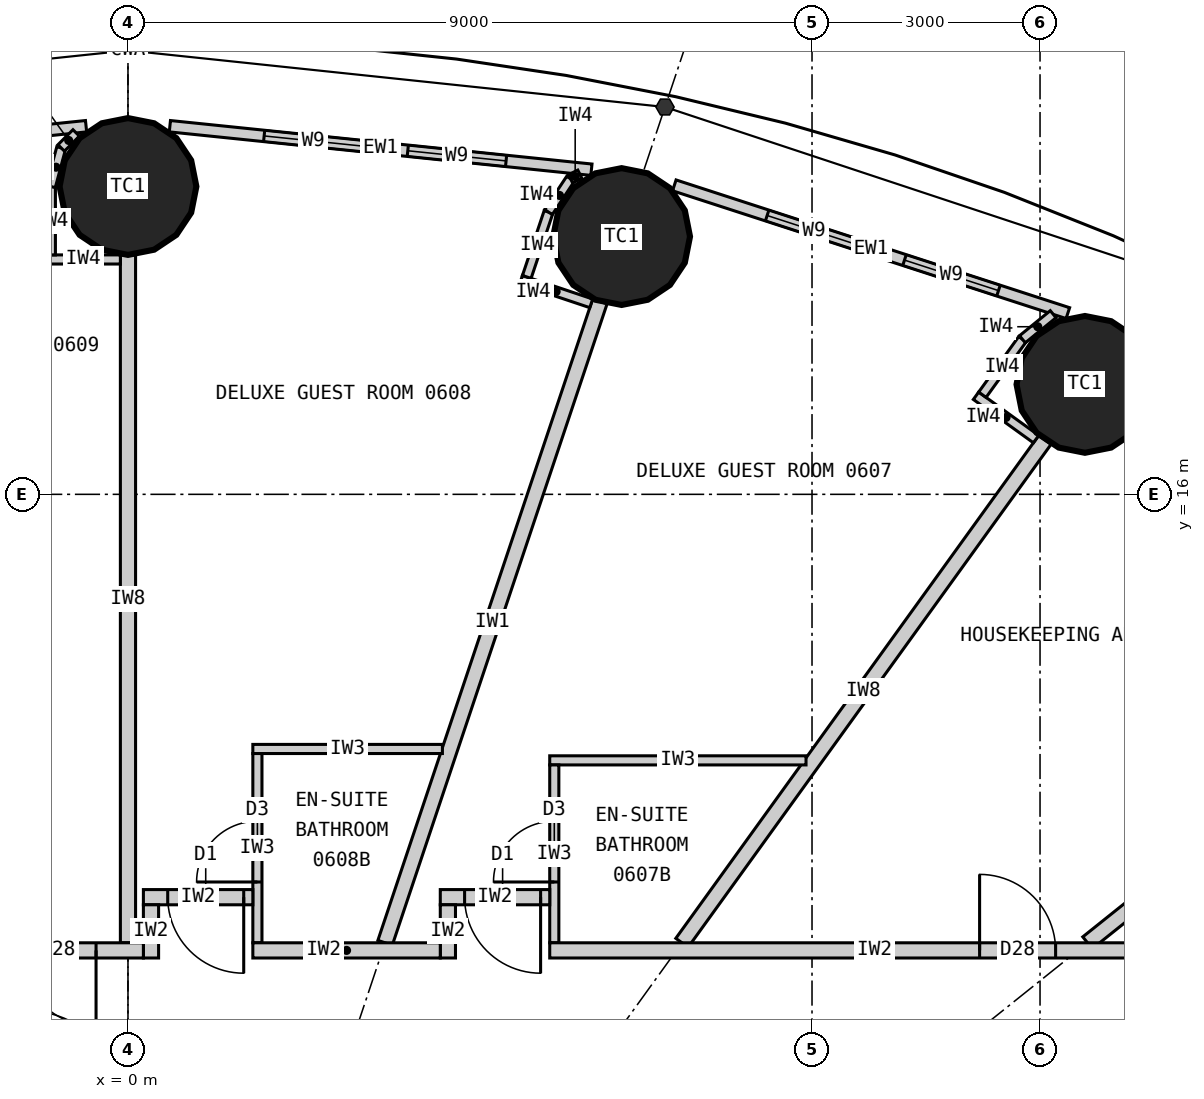
"""IFC4 building model, lengths in metres.
Left out: names, types, materials, properties, quantities, classifications, styles, units other than length and angle.
Written with IfcOpenShell. Run it as: python <this file> out.ifc"""

import sys

from ifc_helpers import new_model, si_unit, direction, frame, frame_2d, origin, origin_2d, place, context, subcontext, project, spatial, rectangle, circle, extrude, element, fill, save


model = new_model("IFC4")
c1 = context("Model", 3, precision=1e-05, world=origin(), true_north=direction((0.0, 1.0)))
c2 = subcontext(c1, "Body", "Model", "MODEL_VIEW")
j1 = project(units=[si_unit("LENGTHUNIT", "METRE"), si_unit("PLANEANGLEUNIT", "RADIAN")], contexts=[c1])
p1 = place(None, origin())
s1 = spatial("IfcSite", under=j1, at=p1, CompositionType="ELEMENT")
p2 = place(p1, origin())
s2 = spatial("IfcBuilding", under=s1, at=p2, CompositionType="ELEMENT")
p3 = place(p2, frame((0.0, 0.0, 32.7)))
s3 = spatial("IfcBuildingStorey", under=s2, at=p3, CompositionType="ELEMENT", Elevation=32.7)
for number, where, z_axis, x_axis in (
    (1, (12.591, 17.447, 0.0), (0.0, 0.0, 1.0), (1.0, 0.0, 0.0)),
    (2, (6.495, 19.391, 0.0), (0.0, 0.0, 1.0), (1.0, 0.0, 0.0)),
    (3, (0.0, 20.05, 0.0), (0.0, 0.0, 1.0), (1.0, 0.0, 0.0)),
):
    element("IfcColumn", number, at=place(p3, frame(where, z_axis=z_axis, x_axis=x_axis)), inside=s3, PredefinedType="COLUMN", context=c2, shape_type="SweptSolid", body=[
        extrude(circle(Radius=0.9, at=origin_2d()), origin(), (0.0, 0.0, 1.0), 3.3),
    ])
p4 = place(p3, frame((12.366, 18.384, 0.0), z_axis=(0.0, 0.0, 1.0), x_axis=(-0.951138486029, 0.308764603532, 0.0)))
e4 = element("IfcWall", 4, at=p4, inside=s3, PredefinedType="ELEMENTEDWALL", context=c2, shape_type="SweptSolid", body=[
    extrude(rectangle(XDim=5.444, YDim=0.15, at=frame_2d((2.722, 0.0))), origin(), (0.0, 0.0, 1.0), 3.12),
])
p5 = place(p4, frame((0.96, 0.0, 0.9)))
e5 = element("IfcOpeningElement", 5, at=p5, cuts=e4, PredefinedType="OPENING", context=c2, shape_type="SweptSolid", body=[
    extrude(rectangle(XDim=1.3, YDim=1.9, at=frame_2d((0.65, 0.95))), frame((0.0, 0.085, 0.0), z_axis=(0.0, -1.0, 0.0), x_axis=(1.0, 0.0, 0.0)), (0.0, 0.0, 1.0), 0.17),
])
p6 = place(p4, frame((2.86, 0.0, 0.9)))
e6 = element("IfcOpeningElement", 6, at=p6, cuts=e4, PredefinedType="OPENING", context=c2, shape_type="SweptSolid", body=[
    extrude(rectangle(XDim=1.3, YDim=1.9, at=frame_2d((0.65, 0.95))), frame((0.0, 0.085, 0.0), z_axis=(0.0, -1.0, 0.0), x_axis=(1.0, 0.0, 0.0)), (0.0, 0.0, 1.0), 0.17),
])
p7 = place(p3, frame((6.098, 20.271, 0.0), z_axis=(0.0, 0.0, 1.0), x_axis=(-0.994723735084, 0.102589915983, 0.0)))
e7 = element("IfcWall", 7, at=p7, inside=s3, PredefinedType="ELEMENTEDWALL", context=c2, shape_type="SweptSolid", body=[
    extrude(rectangle(XDim=5.576, YDim=0.15, at=frame_2d((2.788, 0.0))), origin(), (0.0, 0.0, 1.0), 3.12),
])
p8 = place(p7, frame((1.129, 0.0, 0.9)))
e8 = element("IfcOpeningElement", 8, at=p8, cuts=e7, PredefinedType="OPENING", context=c2, shape_type="SweptSolid", body=[
    extrude(rectangle(XDim=1.3, YDim=1.9, at=frame_2d((0.65, 0.95))), frame((0.0, 0.085, 0.0), z_axis=(0.0, -1.0, 0.0), x_axis=(1.0, 0.0, 0.0)), (0.0, 0.0, 1.0), 0.17),
])
p9 = place(p7, frame((3.029, 0.0, 0.9)))
e9 = element("IfcOpeningElement", 9, at=p9, cuts=e7, PredefinedType="OPENING", context=c2, shape_type="SweptSolid", body=[
    extrude(rectangle(XDim=1.3, YDim=1.9, at=frame_2d((0.65, 0.95))), frame((0.0, 0.085, 0.0), z_axis=(0.0, -1.0, 0.0), x_axis=(1.0, 0.0, 0.0)), (0.0, 0.0, 1.0), 0.17),
])
p10 = place(p3, frame((-0.551, 20.843, 0.0), z_axis=(0.0, 0.0, 1.0), x_axis=(-0.994723735084, -0.102589915983, 0.0)))
e10 = element("IfcWall", 10, at=p10, inside=s3, PredefinedType="ELEMENTEDWALL", context=c2, shape_type="SweptSolid", body=[
    extrude(rectangle(XDim=5.576, YDim=0.15, at=frame_2d((2.788, 0.0))), origin(), (0.0, 0.0, 1.0), 3.12),
])
p11 = place(p10, frame((1.247, 0.0, 0.9)))
e11 = element("IfcOpeningElement", 11, at=p11, cuts=e10, PredefinedType="OPENING", context=c2, shape_type="SweptSolid", body=[
    extrude(rectangle(XDim=1.3, YDim=1.9, at=frame_2d((0.65, 0.95))), frame((0.0, 0.085, 0.0), z_axis=(0.0, -1.0, 0.0), x_axis=(1.0, 0.0, 0.0)), (0.0, 0.0, 1.0), 0.17),
])
p12 = place(p10, frame((3.147, 0.0, 0.9)))
e12 = element("IfcOpeningElement", 12, at=p12, cuts=e10, PredefinedType="OPENING", context=c2, shape_type="SweptSolid", body=[
    extrude(rectangle(XDim=1.3, YDim=1.9, at=frame_2d((0.65, 0.95))), frame((0.0, 0.085, 0.0), z_axis=(0.0, -1.0, 0.0), x_axis=(1.0, 0.0, 0.0)), (0.0, 0.0, 1.0), 0.17),
])
p13 = place(p3, frame((12.625, 10.1, 0.0), z_axis=(0.0, 0.0, 1.0), x_axis=(0.780872884676, 0.624689953479, 0.0)))
e13 = element("IfcWall", 13, at=p13, inside=s3, PredefinedType="PARTITIONING", context=c2, shape_type="SweptSolid", body=[
    extrude(rectangle(XDim=5.845, YDim=0.2, at=frame_2d((2.922, 0.0))), origin(), (0.0, 0.0, 1.0), 2.32),
])
p14 = place(p3, frame((7.289, 10.1, 0.0), z_axis=(0.0, 0.0, 1.0), x_axis=(0.585216319319, 0.810877216108, 0.0)))
e14 = element("IfcWall", 14, at=p14, inside=s3, PredefinedType="PARTITIONING", context=c2, shape_type="SweptSolid", body=[
    extrude(rectangle(XDim=8.16, YDim=0.2, at=frame_2d((4.08, 0.0))), origin(), (0.0, 0.0, 1.0), 2.32),
])
p15 = place(p3, frame((3.383, 10.1, 0.0), z_axis=(0.0, 0.0, 1.0), x_axis=(0.317593727596, 0.948226884344, 0.0)))
e15 = element("IfcWall", 15, at=p15, inside=s3, PredefinedType="PARTITIONING", context=c2, shape_type="SweptSolid", body=[
    extrude(rectangle(XDim=8.899, YDim=0.2, at=frame_2d((4.449, 0.0))), origin(), (0.0, 0.0, 1.0), 2.32),
])
p16 = place(p3, frame((0.0, 10.1, 0.0), z_axis=(0.0, 0.0, 1.0), x_axis=(0.0, 1.0, 0.0)))
e16 = element("IfcWall", 16, at=p16, inside=s3, PredefinedType="PARTITIONING", context=c2, shape_type="SweptSolid", body=[
    extrude(rectangle(XDim=9.05, YDim=0.2, at=frame_2d((4.525, 0.0))), origin(), (0.0, 0.0, 1.0), 2.32),
])
p17 = place(p3, frame((8.921, 12.5, 0.0), z_axis=(0.0, 0.0, 1.0), x_axis=(-1.0, 0.0, 0.0)))
e17 = element("IfcWall", 17, at=p17, inside=s3, PredefinedType="PARTITIONING", context=c2, shape_type="SweptSolid", body=[
    extrude(rectangle(XDim=3.372, YDim=0.12, at=frame_2d((1.686, 0.0))), origin(), (0.0, 0.0, 1.0), 3.12),
])
p18 = place(p3, frame((5.609, 10.1, 0.0), z_axis=(0.0, 0.0, 1.0), x_axis=(0.0, 1.0, 0.0)))
e18 = element("IfcWall", 18, at=p18, inside=s3, PredefinedType="PARTITIONING", context=c2, shape_type="SweptSolid", body=[
    extrude(rectangle(XDim=2.34, YDim=0.12, at=frame_2d((1.17, 0.0))), origin(), (0.0, 0.0, 1.0), 3.12),
])
p19 = place(p18, frame((0.8, 0.0, 0.0)))
e19 = element("IfcOpeningElement", 19, at=p19, cuts=e18, PredefinedType="OPENING", context=c2, shape_type="SweptSolid", body=[
    extrude(rectangle(XDim=0.8, YDim=2.1, at=frame_2d((0.4, 1.05))), frame((0.0, 0.07, 0.0), z_axis=(0.0, -1.0, 0.0), x_axis=(1.0, 0.0, 0.0)), (0.0, 0.0, 1.0), 0.14),
])
p20 = place(p3, frame((4.137, 12.65, 0.0), z_axis=(0.0, 0.0, 1.0), x_axis=(-1.0, 0.0, 0.0)))
e20 = element("IfcWall", 20, at=p20, inside=s3, PredefinedType="PARTITIONING", context=c2, shape_type="SweptSolid", body=[
    extrude(rectangle(XDim=2.494, YDim=0.12, at=frame_2d((1.247, 0.0))), origin(), (0.0, 0.0, 1.0), 3.12),
])
p21 = place(p3, frame((1.703, 10.1, 0.0), z_axis=(0.0, 0.0, 1.0), x_axis=(0.0, 1.0, 0.0)))
e21 = element("IfcWall", 21, at=p21, inside=s3, PredefinedType="PARTITIONING", context=c2, shape_type="SweptSolid", body=[
    extrude(rectangle(XDim=2.49, YDim=0.12, at=frame_2d((1.245, 0.0))), origin(), (0.0, 0.0, 1.0), 3.12),
])
p22 = place(p21, frame((0.8, 0.0, 0.0)))
e22 = element("IfcOpeningElement", 22, at=p22, cuts=e21, PredefinedType="OPENING", context=c2, shape_type="SweptSolid", body=[
    extrude(rectangle(XDim=0.8, YDim=2.1, at=frame_2d((0.4, 1.05))), frame((0.0, 0.07, 0.0), z_axis=(0.0, -1.0, 0.0), x_axis=(1.0, 0.0, 0.0)), (0.0, 0.0, 1.0), 0.14),
])
p23 = place(p3, frame((4.109, 10.7, 0.0), z_axis=(0.0, 0.0, 1.0), x_axis=(1.0, 0.0, 0.0)))
e23 = element("IfcWall", 23, at=p23, inside=s3, PredefinedType="PARTITIONING", context=c2, shape_type="SweptSolid", body=[
    extrude(rectangle(XDim=1.44, YDim=0.2, at=frame_2d((0.72, 0.0))), origin(), (0.0, 0.0, 1.0), 3.12),
])
p24 = place(p23, frame((0.32, 0.0, 0.0)))
e24 = element("IfcOpeningElement", 24, at=p24, cuts=e23, PredefinedType="OPENING", context=c2, shape_type="SweptSolid", body=[
    extrude(rectangle(XDim=1.0, YDim=2.2, at=frame_2d((0.5, 1.1))), frame((0.0, 0.11, 0.0), z_axis=(0.0, -1.0, 0.0), x_axis=(1.0, 0.0, 0.0)), (0.0, 0.0, 1.0), 0.22),
])
p25 = place(p3, frame((4.209, 9.9, 0.0), z_axis=(0.0, 0.0, 1.0), x_axis=(0.0, 1.0, 0.0)))
e25 = element("IfcWall", 25, at=p25, inside=s3, PredefinedType="PARTITIONING", context=c2, shape_type="SweptSolid", body=[
    extrude(rectangle(XDim=0.7, YDim=0.2, at=frame_2d((0.35, 0.0))), origin(), (0.0, 0.0, 1.0), 3.12),
])
p26 = place(p3, frame((0.203, 10.7, 0.0), z_axis=(0.0, 0.0, 1.0), x_axis=(1.0, 0.0, 0.0)))
e26 = element("IfcWall", 26, at=p26, inside=s3, PredefinedType="PARTITIONING", context=c2, shape_type="SweptSolid", body=[
    extrude(rectangle(XDim=1.44, YDim=0.2, at=frame_2d((0.72, 0.0))), origin(), (0.0, 0.0, 1.0), 3.12),
])
p27 = place(p26, frame((0.32, 0.0, 0.0)))
e27 = element("IfcOpeningElement", 27, at=p27, cuts=e26, PredefinedType="OPENING", context=c2, shape_type="SweptSolid", body=[
    extrude(rectangle(XDim=1.0, YDim=2.2, at=frame_2d((0.5, 1.1))), frame((0.0, 0.11, 0.0), z_axis=(0.0, -1.0, 0.0), x_axis=(1.0, 0.0, 0.0)), (0.0, 0.0, 1.0), 0.22),
])
p28 = place(p3, frame((0.303, 9.9, 0.0), z_axis=(0.0, 0.0, 1.0), x_axis=(0.0, 1.0, 0.0)))
e28 = element("IfcWall", 28, at=p28, inside=s3, PredefinedType="PARTITIONING", context=c2, shape_type="SweptSolid", body=[
    extrude(rectangle(XDim=0.7, YDim=0.2, at=frame_2d((0.35, 0.0))), origin(), (0.0, 0.0, 1.0), 3.12),
])
p29 = place(p3, frame((-4.109, 10.0, 0.0), z_axis=(0.0, 0.0, 1.0), x_axis=(1.0, 0.0, 0.0)))
e29 = element("IfcWall", 29, at=p29, inside=s3, PredefinedType="PARTITIONING", context=c2, shape_type="SweptSolid", body=[
    extrude(rectangle(XDim=4.312, YDim=0.2, at=frame_2d((2.156, 0.0))), origin(), (0.0, 0.0, 1.0), 3.12),
])
p30 = place(p29, frame((2.689, 0.0, 0.0)))
e30 = element("IfcOpeningElement", 30, at=p30, cuts=e29, PredefinedType="OPENING", context=c2, shape_type="SweptSolid", body=[
    extrude(rectangle(XDim=1.0, YDim=2.2, at=frame_2d((0.5, 1.1))), frame((0.0, 0.11, 0.0), z_axis=(0.0, -1.0, 0.0), x_axis=(1.0, 0.0, 0.0)), (0.0, 0.0, 1.0), 0.22),
])
p31 = place(p3, frame((1.643, 10.0, 0.0), z_axis=(0.0, 0.0, 1.0), x_axis=(1.0, 0.0, 0.0)))
e31 = element("IfcWall", 31, at=p31, inside=s3, PredefinedType="PARTITIONING", context=c2, shape_type="SweptSolid", body=[
    extrude(rectangle(XDim=2.466, YDim=0.2, at=frame_2d((1.233, 0.0))), origin(), (0.0, 0.0, 1.0), 3.12),
])
p32 = place(p3, frame((5.549, 10.0, 0.0), z_axis=(0.0, 0.0, 1.0), x_axis=(1.0, 0.0, 0.0)))
e32 = element("IfcWall", 32, at=p32, inside=s3, PredefinedType="PARTITIONING", context=c2, shape_type="SweptSolid", body=[
    extrude(rectangle(XDim=8.551, YDim=0.2, at=frame_2d((4.275, 0.0))), origin(), (0.0, 0.0, 1.0), 3.12),
])
p33 = place(p32, frame((5.656, 0.0, 0.0)))
e33 = element("IfcOpeningElement", 33, at=p33, cuts=e32, PredefinedType="OPENING", context=c2, shape_type="SweptSolid", body=[
    extrude(rectangle(XDim=1.0, YDim=2.2, at=frame_2d((0.5, 1.1))), frame((0.0, 0.11, 0.0), z_axis=(0.0, -1.0, 0.0), x_axis=(1.0, 0.0, 0.0)), (0.0, 0.0, 1.0), 0.22),
])
p34 = place(p3, frame((11.948, 16.727, 0.0), z_axis=(0.0, 0.0, 1.0), x_axis=(-0.810897160646, 0.585188683123, 0.0)))
e34 = element("IfcWall", 34, at=p34, inside=s3, PredefinedType="PARTITIONING", context=c2, shape_type="SweptSolid", body=[
    extrude(rectangle(XDim=0.975, YDim=0.12, at=frame_2d((0.487, 0.0))), origin(), (0.0, 0.0, 1.0), 3.12),
])
p35 = place(p3, frame((11.241, 17.31, 0.0), z_axis=(0.0, 0.0, 1.0), x_axis=(0.585054732094, 0.810993810367, 0.0)))
e35 = element("IfcWall", 35, at=p35, inside=s3, PredefinedType="PARTITIONING", context=c2, shape_type="SweptSolid", body=[
    extrude(rectangle(XDim=0.9, YDim=0.12, at=frame_2d((0.45, 0.0))), origin(), (0.0, 0.0, 1.0), 3.12),
])
p36 = place(p3, frame((11.768, 18.04, 0.0), z_axis=(0.0, 0.0, 1.0), x_axis=(0.775268927517, 0.631631292787, 0.0)))
e36 = element("IfcWall", 36, at=p36, inside=s3, PredefinedType="PARTITIONING", context=c2, shape_type="SweptSolid", body=[
    extrude(rectangle(XDim=0.522, YDim=0.12, at=frame_2d((0.261, 0.0))), origin(), (0.0, 0.0, 1.0), 3.12),
])
p37 = place(p3, frame((6.095, 18.513, 0.0), z_axis=(0.0, 0.0, 1.0), x_axis=(-0.948281677008, 0.317430088446, 0.0)))
e37 = element("IfcWall", 37, at=p37, inside=s3, PredefinedType="PARTITIONING", context=c2, shape_type="SweptSolid", body=[
    extrude(rectangle(XDim=0.974, YDim=0.12, at=frame_2d((0.487, 0.0))), origin(), (0.0, 0.0, 1.0), 3.12),
])
p38 = place(p3, frame((5.247, 18.86, 0.0), z_axis=(0.0, 0.0, 1.0), x_axis=(0.317610704489, 0.94822119803, 0.0)))
e38 = element("IfcWall", 38, at=p38, inside=s3, PredefinedType="PARTITIONING", context=c2, shape_type="SweptSolid", body=[
    extrude(rectangle(XDim=0.9, YDim=0.12, at=frame_2d((0.45, 0.0))), origin(), (0.0, 0.0, 1.0), 3.12),
])
p39 = place(p3, frame((5.533, 19.714, 0.0), z_axis=(0.0, 0.0, 1.0), x_axis=(0.552014331743, 0.833834622422, 0.0)))
e39 = element("IfcWall", 39, at=p39, inside=s3, PredefinedType="PARTITIONING", context=c2, shape_type="SweptSolid", body=[
    extrude(rectangle(XDim=0.525, YDim=0.12, at=frame_2d((0.262, 0.0))), origin(), (0.0, 0.0, 1.0), 3.12),
])
p40 = place(p3, frame((5.823, 20.151, 0.0), z_axis=(0.0, 0.0, 1.0), x_axis=(0.894784104941, 0.446499054362, 0.0)))
e40 = element("IfcWall", 40, at=p40, inside=s3, PredefinedType="PARTITIONING", context=c2, shape_type="SweptSolid", body=[
    extrude(rectangle(XDim=0.137, YDim=0.12, at=frame_2d((0.068, 0.0))), origin(), (0.0, 0.0, 1.0), 3.12),
])
p41 = place(p3, frame((-0.1, 19.09, 0.0), z_axis=(0.0, 0.0, 1.0), x_axis=(-1.0, 0.0, 0.0)))
e41 = element("IfcWall", 41, at=p41, inside=s3, PredefinedType="PARTITIONING", context=c2, shape_type="SweptSolid", body=[
    extrude(rectangle(XDim=0.974, YDim=0.12, at=frame_2d((0.487, 0.0))), origin(), (0.0, 0.0, 1.0), 3.12),
])
p42 = place(p3, frame((-1.015, 19.15, 0.0), z_axis=(0.0, 0.0, 1.0), x_axis=(0.0, 1.0, 0.0)))
e42 = element("IfcWall", 42, at=p42, inside=s3, PredefinedType="PARTITIONING", context=c2, shape_type="SweptSolid", body=[
    extrude(rectangle(XDim=0.9, YDim=0.12, at=frame_2d((0.45, 0.0))), origin(), (0.0, 0.0, 1.0), 3.12),
])
p43 = place(p3, frame((-1.015, 20.05, 0.0), z_axis=(0.0, 0.0, 1.0), x_axis=(0.258906465625, 0.96590239779, 0.0)))
e43 = element("IfcWall", 43, at=p43, inside=s3, PredefinedType="PARTITIONING", context=c2, shape_type="SweptSolid", body=[
    extrude(rectangle(XDim=0.525, YDim=0.12, at=frame_2d((0.263, 0.0))), origin(), (0.0, 0.0, 1.0), 3.12),
])
p44 = place(p3, frame((-0.879, 20.557, 0.0), z_axis=(0.0, 0.0, 1.0), x_axis=(0.707106781187, 0.707106781187, 0.0)))
e44 = element("IfcWall", 44, at=p44, inside=s3, PredefinedType="PARTITIONING", context=c2, shape_type="SweptSolid", body=[
    extrude(rectangle(XDim=0.279, YDim=0.12, at=frame_2d((0.14, 0.0))), origin(), (0.0, 0.0, 1.0), 3.12),
])
p45 = place(p5, origin())
e45 = element("IfcWindow", 45, at=p45, inside=s3, PartitioningType="SINGLE_PANEL", PredefinedType="WINDOW", context=c2, shape_type="SweptSolid", body=[
    extrude(rectangle(XDim=1.3, YDim=1.9, at=frame_2d((0.65, 0.95))), frame((0.0, 0.03, 0.0), z_axis=(0.0, -1.0, 0.0), x_axis=(1.0, 0.0, 0.0)), (0.0, 0.0, 1.0), 0.06),
])
fill(e5, e45)
p46 = place(p6, origin())
e46 = element("IfcWindow", 46, at=p46, inside=s3, PartitioningType="SINGLE_PANEL", PredefinedType="WINDOW", context=c2, shape_type="SweptSolid", body=[
    extrude(rectangle(XDim=1.3, YDim=1.9, at=frame_2d((0.65, 0.95))), frame((0.0, 0.03, 0.0), z_axis=(0.0, -1.0, 0.0), x_axis=(1.0, 0.0, 0.0)), (0.0, 0.0, 1.0), 0.06),
])
fill(e6, e46)
p47 = place(p8, origin())
e47 = element("IfcWindow", 47, at=p47, inside=s3, PartitioningType="SINGLE_PANEL", PredefinedType="WINDOW", context=c2, shape_type="SweptSolid", body=[
    extrude(rectangle(XDim=1.3, YDim=1.9, at=frame_2d((0.65, 0.95))), frame((0.0, 0.03, 0.0), z_axis=(0.0, -1.0, 0.0), x_axis=(1.0, 0.0, 0.0)), (0.0, 0.0, 1.0), 0.06),
])
fill(e8, e47)
p48 = place(p9, origin())
e48 = element("IfcWindow", 48, at=p48, inside=s3, PartitioningType="SINGLE_PANEL", PredefinedType="WINDOW", context=c2, shape_type="SweptSolid", body=[
    extrude(rectangle(XDim=1.3, YDim=1.9, at=frame_2d((0.65, 0.95))), frame((0.0, 0.03, 0.0), z_axis=(0.0, -1.0, 0.0), x_axis=(1.0, 0.0, 0.0)), (0.0, 0.0, 1.0), 0.06),
])
fill(e9, e48)
p49 = place(p33, origin())
e49 = element("IfcDoor", 49, at=p49, inside=s3, OperationType="SINGLE_SWING_LEFT", PredefinedType="DOOR", context=c2, shape_type="SweptSolid", body=[
    extrude(rectangle(XDim=1.0, YDim=2.2, at=frame_2d((0.5, 1.1))), frame((0.0, 0.025, 0.0), z_axis=(0.0, -1.0, 0.0), x_axis=(1.0, 0.0, 0.0)), (0.0, 0.0, 1.0), 0.05),
])
fill(e33, e49)
p50 = place(p19, origin())
e50 = element("IfcDoor", 50, at=p50, inside=s3, OperationType="SINGLE_SWING_LEFT", PredefinedType="DOOR", context=c2, shape_type="SweptSolid", body=[
    extrude(rectangle(XDim=0.8, YDim=2.1, at=frame_2d((0.4, 1.05))), frame((0.0, 0.025, 0.0), z_axis=(0.0, -1.0, 0.0), x_axis=(1.0, 0.0, 0.0)), (0.0, 0.0, 1.0), 0.05),
])
fill(e19, e50)
p51 = place(p24, origin())
e51 = element("IfcDoor", 51, at=p51, inside=s3, OperationType="SINGLE_SWING_RIGHT", PredefinedType="DOOR", context=c2, shape_type="SweptSolid", body=[
    extrude(rectangle(XDim=1.0, YDim=2.2, at=frame_2d((0.5, 1.1))), frame((0.0, 0.025, 0.0), z_axis=(0.0, -1.0, 0.0), x_axis=(1.0, 0.0, 0.0)), (0.0, 0.0, 1.0), 0.05),
])
fill(e24, e51)
p52 = place(p22, origin())
e52 = element("IfcDoor", 52, at=p52, inside=s3, OperationType="SINGLE_SWING_LEFT", PredefinedType="DOOR", context=c2, shape_type="SweptSolid", body=[
    extrude(rectangle(XDim=0.8, YDim=2.1, at=frame_2d((0.4, 1.05))), frame((0.0, 0.025, 0.0), z_axis=(0.0, -1.0, 0.0), x_axis=(1.0, 0.0, 0.0)), (0.0, 0.0, 1.0), 0.05),
])
fill(e22, e52)
p53 = place(p27, origin())
e53 = element("IfcDoor", 53, at=p53, inside=s3, OperationType="SINGLE_SWING_RIGHT", PredefinedType="DOOR", context=c2, shape_type="SweptSolid", body=[
    extrude(rectangle(XDim=1.0, YDim=2.2, at=frame_2d((0.5, 1.1))), frame((0.0, 0.025, 0.0), z_axis=(0.0, -1.0, 0.0), x_axis=(1.0, 0.0, 0.0)), (0.0, 0.0, 1.0), 0.05),
])
fill(e27, e53)
p54 = place(p30, origin())
e54 = element("IfcDoor", 54, at=p54, inside=s3, OperationType="SINGLE_SWING_RIGHT", PredefinedType="DOOR", context=c2, shape_type="SweptSolid", body=[
    extrude(rectangle(XDim=1.0, YDim=2.2, at=frame_2d((0.5, 1.1))), frame((0.0, 0.025, 0.0), z_axis=(0.0, -1.0, 0.0), x_axis=(1.0, 0.0, 0.0)), (0.0, 0.0, 1.0), 0.05),
])
fill(e30, e54)
save(model, sys.argv[1])
